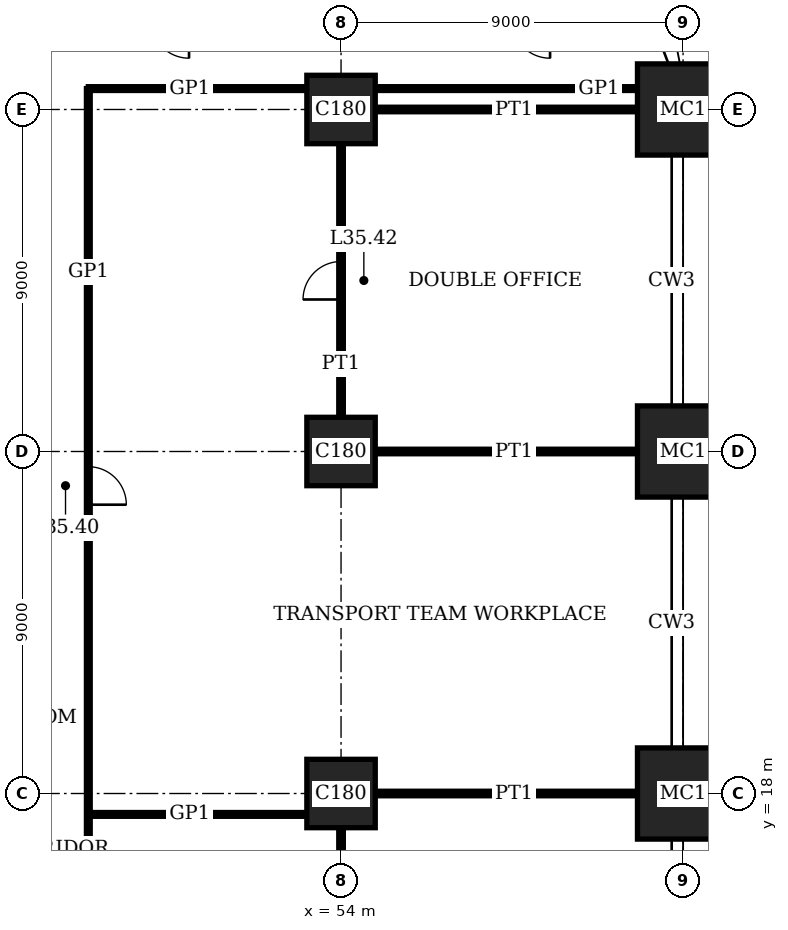
"""IFC4 building model, lengths in metres.
Left out: names, types, materials, properties, quantities, classifications, styles, units other than length and angle.
Written with IfcOpenShell. Run it as: python <this file> out.ifc"""

import sys

from ifc_helpers import new_model, si_unit, direction, frame, frame_2d, origin, origin_2d, place, context, subcontext, project, spatial, rectangle, extrude, element, fill, save


model = new_model("IFC4")
c1 = context("Model", 3, precision=1e-05, world=origin(), true_north=direction((0.0, 1.0)))
c2 = subcontext(c1, "Body", "Model", "MODEL_VIEW")
j1 = project(units=[si_unit("LENGTHUNIT", "METRE"), si_unit("PLANEANGLEUNIT", "RADIAN")], contexts=[c1])
p1 = place(None, origin())
s1 = spatial("IfcSite", under=j1, at=p1, CompositionType="ELEMENT")
p2 = place(p1, origin())
s2 = spatial("IfcBuilding", under=s1, at=p2, CompositionType="ELEMENT")
p3 = place(p2, frame((0.0, 0.0, 145.0)))
s3 = spatial("IfcBuildingStorey", under=s2, at=p3, CompositionType="ELEMENT", Elevation=145.0)
for number, where, z_axis, x_axis in (
    (1, (54.0, 18.0, 0.0), (0.0, 0.0, 1.0), (1.0, 0.0, 0.0)),
    (2, (54.0, 27.0, 0.0), (0.0, 0.0, 1.0), (1.0, 0.0, 0.0)),
    (3, (54.0, 36.0, 0.0), (0.0, 0.0, 1.0), (1.0, 0.0, 0.0)),
):
    element("IfcColumn", number, at=place(p3, frame(where, z_axis=z_axis, x_axis=x_axis)), inside=s3, PredefinedType="COLUMN", context=c2, shape_type="SweptSolid", body=[
        extrude(rectangle(XDim=1.8, YDim=1.8, at=origin_2d()), origin(), (0.0, 0.0, 1.0), 4.0),
    ])
for number, where, z_axis, x_axis in (
    (4, (63.0, 18.0, 0.0), (0.0, 0.0, 1.0), (1.0, 0.0, 0.0)),
    (5, (63.0, 27.0, 0.0), (0.0, 0.0, 1.0), (1.0, 0.0, 0.0)),
    (6, (63.0, 36.0, 0.0), (0.0, 0.0, 1.0), (1.0, 0.0, 0.0)),
):
    element("IfcColumn", number, at=place(p3, frame(where, z_axis=z_axis, x_axis=x_axis)), inside=s3, PredefinedType="COLUMN", context=c2, shape_type="SweptSolid", body=[
        extrude(rectangle(XDim=2.4, YDim=2.4, at=origin_2d()), origin(), (0.0, 0.0, 1.0), 4.0),
    ])
p4 = place(p3, frame((47.35, 17.45, 0.0), z_axis=(0.0, 0.0, 1.0), x_axis=(1.0, 0.0, 0.0)))
e7 = element("IfcWall", 7, at=p4, inside=s3, PredefinedType="PARTITIONING", context=c2, shape_type="SweptSolid", body=[
    extrude(rectangle(XDim=5.75, YDim=0.1, at=frame_2d((2.875, 0.0))), origin(), (0.0, 0.0, 1.0), 3.05),
])
for number, where, z_axis, x_axis in (
    (8, (54.9, 18.0, 0.0), (0.0, 0.0, 1.0), (1.0, 0.0, 0.0)),
    (9, (54.9, 27.0, 0.0), (0.0, 0.0, 1.0), (1.0, 0.0, 0.0)),
    (10, (54.9, 36.0, 0.0), (0.0, 0.0, 1.0), (1.0, 0.0, 0.0)),
):
    element("IfcWall", number, at=place(p3, frame(where, z_axis=z_axis, x_axis=x_axis)), inside=s3, PredefinedType="PARTITIONING", context=c2, shape_type="SweptSolid", body=[
        extrude(rectangle(XDim=6.9, YDim=0.12, at=frame_2d((3.45, 0.0))), origin(), (0.0, 0.0, 1.0), 3.05),
    ])
p5 = place(p3, frame((47.35, 36.55, 0.0), z_axis=(0.0, 0.0, 1.0), x_axis=(1.0, 0.0, 0.0)))
e11 = element("IfcWall", 11, at=p5, inside=s3, PredefinedType="PARTITIONING", context=c2, shape_type="SweptSolid", body=[
    extrude(rectangle(XDim=5.75, YDim=0.1, at=frame_2d((2.875, 0.0))), origin(), (0.0, 0.0, 1.0), 3.05),
])
p6 = place(p3, frame((54.9, 36.55, 0.0), z_axis=(0.0, 0.0, 1.0), x_axis=(1.0, 0.0, 0.0)))
e12 = element("IfcWall", 12, at=p6, inside=s3, PredefinedType="PARTITIONING", context=c2, shape_type="SweptSolid", body=[
    extrude(rectangle(XDim=6.9, YDim=0.1, at=frame_2d((3.45, 0.0))), origin(), (0.0, 0.0, 1.0), 3.05),
])
p7 = place(p3, frame((47.35, 15.65, 0.0), z_axis=(0.0, 0.0, 1.0), x_axis=(0.0, 1.0, 0.0)))
e13 = element("IfcWall", 13, at=p7, inside=s3, PredefinedType="PARTITIONING", context=c2, shape_type="SweptSolid", body=[
    extrude(rectangle(XDim=20.9, YDim=0.1, at=frame_2d((10.45, 0.0))), origin(), (0.0, 0.0, 1.0), 3.75),
])
p8 = place(p7, frame((9.95, 0.0, 0.0)))
e14 = element("IfcOpeningElement", 14, at=p8, cuts=e13, PredefinedType="OPENING", context=c2, shape_type="SweptSolid", body=[
    extrude(rectangle(XDim=1.0, YDim=2.4, at=frame_2d((0.5, 1.2))), frame((0.0, 0.06, 0.0), z_axis=(0.0, -1.0, 0.0), x_axis=(1.0, 0.0, 0.0)), (0.0, 0.0, 1.0), 0.12),
])
p9 = place(p3, frame((54.0, 9.9, 0.0), z_axis=(0.0, 0.0, 1.0), x_axis=(0.0, 1.0, 0.0)))
e15 = element("IfcWall", 15, at=p9, inside=s3, PredefinedType="PARTITIONING", context=c2, shape_type="SweptSolid", body=[
    extrude(rectangle(XDim=7.2, YDim=0.12, at=frame_2d((3.6, 0.0))), origin(), (0.0, 0.0, 1.0), 3.05),
])
p10 = place(p9, frame((3.1, 0.0, 0.0)))
e16 = element("IfcOpeningElement", 16, at=p10, cuts=e15, PredefinedType="OPENING", context=c2, shape_type="SweptSolid", body=[
    extrude(rectangle(XDim=1.0, YDim=2.4, at=frame_2d((0.5, 1.2))), frame((0.0, 0.07, 0.0), z_axis=(0.0, -1.0, 0.0), x_axis=(1.0, 0.0, 0.0)), (0.0, 0.0, 1.0), 0.14),
])
p11 = place(p3, frame((54.0, 27.9, 0.0), z_axis=(0.0, 0.0, 1.0), x_axis=(0.0, 1.0, 0.0)))
e17 = element("IfcWall", 17, at=p11, inside=s3, PredefinedType="PARTITIONING", context=c2, shape_type="SweptSolid", body=[
    extrude(rectangle(XDim=7.2, YDim=0.12, at=frame_2d((3.6, 0.0))), origin(), (0.0, 0.0, 1.0), 3.05),
])
p12 = place(p11, frame((3.1, 0.0, 0.0)))
e18 = element("IfcOpeningElement", 18, at=p12, cuts=e17, PredefinedType="OPENING", context=c2, shape_type="SweptSolid", body=[
    extrude(rectangle(XDim=1.0, YDim=2.4, at=frame_2d((0.5, 1.2))), frame((0.0, 0.07, 0.0), z_axis=(0.0, -1.0, 0.0), x_axis=(1.0, 0.0, 0.0)), (0.0, 0.0, 1.0), 0.14),
])
p13 = place(p8, origin())
e19 = element("IfcDoor", 19, at=p13, inside=s3, OperationType="SINGLE_SWING_LEFT", PredefinedType="DOOR", context=c2, shape_type="SweptSolid", body=[
    extrude(rectangle(XDim=1.0, YDim=2.4, at=frame_2d((0.5, 1.2))), frame((0.0, 0.02, 0.0), z_axis=(0.0, -1.0, 0.0), x_axis=(1.0, 0.0, 0.0)), (0.0, 0.0, 1.0), 0.04),
])
fill(e14, e19)
p14 = place(p12, origin())
e20 = element("IfcDoor", 20, at=p14, inside=s3, OperationType="SINGLE_SWING_RIGHT", PredefinedType="DOOR", context=c2, shape_type="SweptSolid", body=[
    extrude(rectangle(XDim=1.0, YDim=2.4, at=frame_2d((0.5, 1.2))), frame((0.0, 0.025, 0.0), z_axis=(0.0, -1.0, 0.0), x_axis=(1.0, 0.0, 0.0)), (0.0, 0.0, 1.0), 0.05),
])
fill(e18, e20)
save(model, sys.argv[1])
